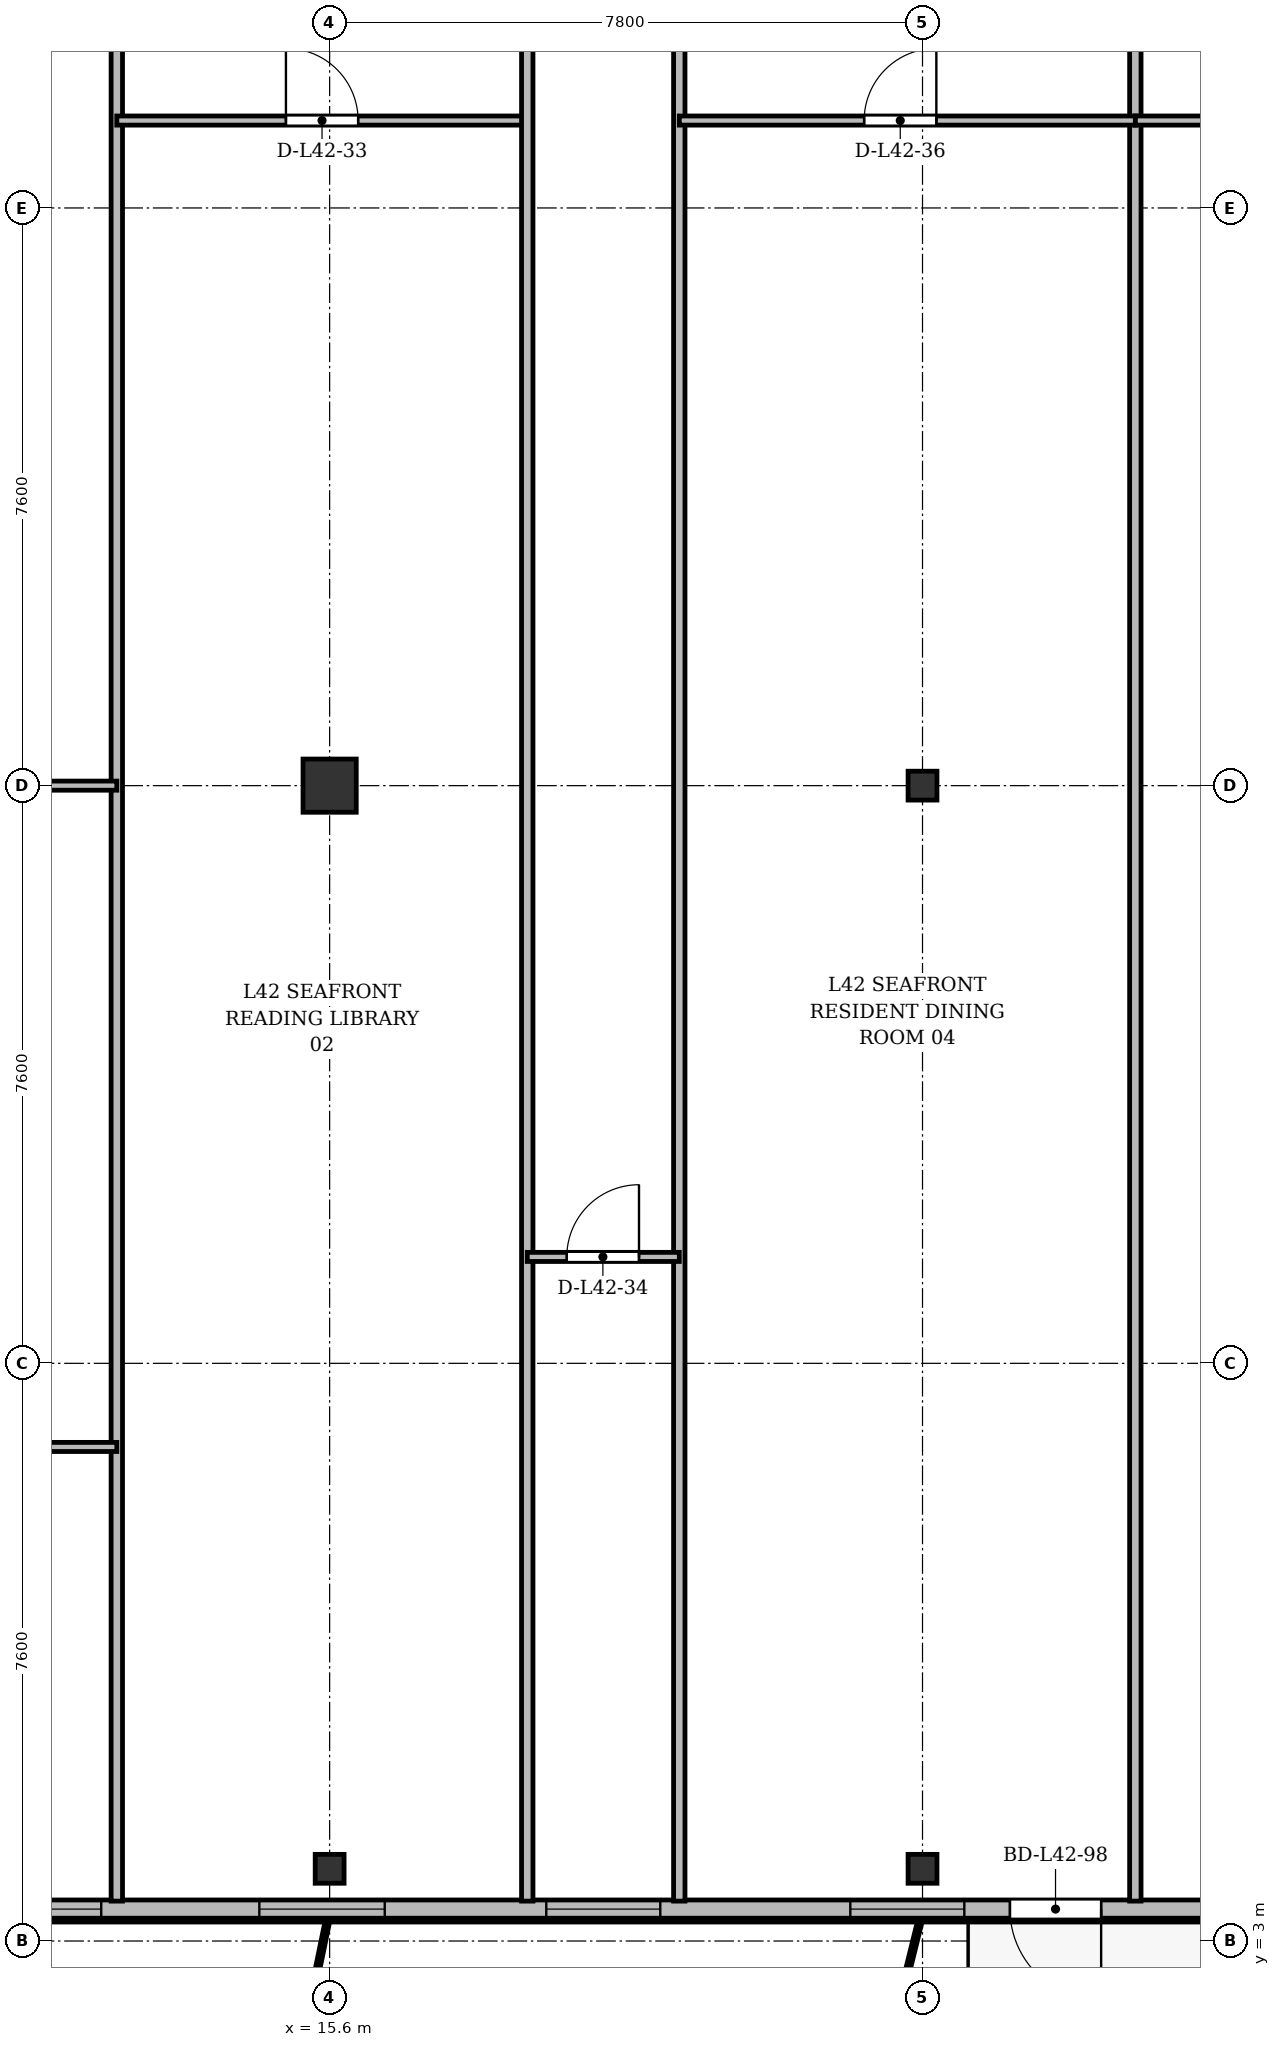
"""IFC4 building model, lengths in metres.
Left out: names, types, materials, properties, quantities, classifications, styles, units other than length and angle.
Written with IfcOpenShell. Run it as: python <this file> out.ifc"""

import sys

from ifc_helpers import new_model, si_unit, direction, frame, frame_2d, origin, origin_2d, place, context, subcontext, project, spatial, rectangle, i_section, extrude, source, transform, mapped, element, fill, save


model = new_model("IFC4")
c1 = context("Model", 3, precision=1e-05, world=origin(), true_north=direction((0.0, 1.0)))
c2 = subcontext(c1, "Body", "Model", "MODEL_VIEW")
j1 = project(units=[si_unit("LENGTHUNIT", "METRE"), si_unit("PLANEANGLEUNIT", "RADIAN")], contexts=[c1])
p1 = place(None, origin())
s1 = spatial("IfcSite", under=j1, at=p1, CompositionType="ELEMENT")
p2 = place(p1, origin())
s2 = spatial("IfcBuilding", under=s1, at=p2, CompositionType="ELEMENT")
p3 = place(p2, frame((0.0, 0.0, 160.9)))
s3 = spatial("IfcBuildingStorey", under=s2, at=p3, CompositionType="ELEMENT", Elevation=160.9)
m1 = source(origin(), c2, "Body", "SweptSolid", [
    extrude(i_section(OverallWidth=0.38, OverallDepth=0.38, WebThickness=0.02, FlangeThickness=0.03, at=origin_2d()), origin(), (0.0, 0.0, 1.0), 3.6),
])
p4 = place(p3, frame((15.6, 3.95, 0.0), z_axis=(0.0, 0.0, 1.0), x_axis=(1.0, 0.0, 0.0)))
e1 = element("IfcColumn", 1, at=p4, inside=s3, PredefinedType="COLUMN", context=c2, shape_type="MappedRepresentation", body=[
    mapped(m1, transform((0.0, 0.0, 0.0), x_axis=(1.0, 0.0, 0.0), y_axis=(0.0, 1.0, 0.0), z_axis=(0.0, 0.0, 1.0), scale=1.0)),
])
m2 = source(origin(), c2, "Body", "SweptSolid", [
    extrude(rectangle(XDim=0.7, YDim=0.7, at=origin_2d()), origin(), (0.0, 0.0, 1.0), 3.6),
])
p5 = place(p3, frame((15.6, 18.2, 0.0), z_axis=(0.0, 0.0, 1.0), x_axis=(1.0, 0.0, 0.0)))
e2 = element("IfcColumn", 2, at=p5, inside=s3, PredefinedType="COLUMN", context=c2, shape_type="MappedRepresentation", body=[
    mapped(m2, transform((0.0, 0.0, 0.0), x_axis=(1.0, 0.0, 0.0), y_axis=(0.0, 1.0, 0.0), z_axis=(0.0, 0.0, 1.0), scale=1.0)),
])
for number, where, z_axis, x_axis in (
    (3, (23.4, 3.95, 0.0), (0.0, 0.0, 1.0), (1.0, 0.0, 0.0)),
    (4, (23.4, 18.2, 0.0), (0.0, 0.0, 1.0), (1.0, 0.0, 0.0)),
):
    element("IfcColumn", number, at=place(p3, frame(where, z_axis=z_axis, x_axis=x_axis)), inside=s3, PredefinedType="COLUMN", context=c2, shape_type="MappedRepresentation", body=[
        mapped(m1, transform((0.0, 0.0, 0.0), x_axis=(1.0, 0.0, 0.0), y_axis=(0.0, 1.0, 0.0), z_axis=(0.0, 0.0, 1.0), scale=1.0)),
    ])
p6 = place(p3, frame((63.6, 3.42, 0.0), z_axis=(0.0, 0.0, 1.0), x_axis=(-1.0, 0.0, 0.0)))
e5 = element("IfcWall", 5, at=p6, inside=s3, PredefinedType="SOLIDWALL", context=c2, shape_type="SweptSolid", body=[
    extrude(rectangle(XDim=52.8, YDim=0.24, at=frame_2d((26.4, 0.0))), origin(), (0.0, 0.0, 1.0), 3.35),
])
p7 = place(p6, frame((0.295, 0.0, 0.9)))
e6 = element("IfcOpeningElement", 6, at=p7, cuts=e5, PredefinedType="OPENING", context=c2, shape_type="SweptSolid", body=[
    extrude(rectangle(XDim=1.5, YDim=1.75, at=frame_2d((0.75, 0.875))), frame((0.0, 0.13, 0.0), z_axis=(0.0, -1.0, 0.0), x_axis=(1.0, 0.0, 0.0)), (0.0, 0.0, 1.0), 0.26),
])
p8 = place(p6, frame((3.7, 0.0, 0.9)))
e7 = element("IfcOpeningElement", 7, at=p8, cuts=e5, PredefinedType="OPENING", context=c2, shape_type="SweptSolid", body=[
    extrude(rectangle(XDim=2.0, YDim=1.95, at=frame_2d((1.0, 0.975))), frame((0.0, 0.13, 0.0), z_axis=(0.0, -1.0, 0.0), x_axis=(1.0, 0.0, 0.0)), (0.0, 0.0, 1.0), 0.26),
])
p9 = place(p6, frame((7.635, 0.0, 0.0)))
e8 = element("IfcOpeningElement", 8, at=p9, cuts=e5, PredefinedType="OPENING", context=c2, shape_type="SweptSolid", body=[
    extrude(rectangle(XDim=1.2, YDim=2.2, at=frame_2d((0.6, 1.1))), frame((0.0, 0.13, 0.0), z_axis=(0.0, -1.0, 0.0), x_axis=(1.0, 0.0, 0.0)), (0.0, 0.0, 1.0), 0.26),
])
p10 = place(p6, frame((9.7, 0.0, 0.9)))
e9 = element("IfcOpeningElement", 9, at=p10, cuts=e5, PredefinedType="OPENING", context=c2, shape_type="SweptSolid", body=[
    extrude(rectangle(XDim=1.8, YDim=1.8, at=frame_2d((0.9, 0.9))), frame((0.0, 0.13, 0.0), z_axis=(0.0, -1.0, 0.0), x_axis=(1.0, 0.0, 0.0)), (0.0, 0.0, 1.0), 0.26),
])
p11 = place(p6, frame((12.25, 0.0, 0.9)))
e10 = element("IfcOpeningElement", 10, at=p11, cuts=e5, PredefinedType="OPENING", context=c2, shape_type="SweptSolid", body=[
    extrude(rectangle(XDim=1.5, YDim=1.75, at=frame_2d((0.75, 0.875))), frame((0.0, 0.13, 0.0), z_axis=(0.0, -1.0, 0.0), x_axis=(1.0, 0.0, 0.0)), (0.0, 0.0, 1.0), 0.26),
])
p12 = place(p6, frame((16.25, 0.0, 0.9)))
e11 = element("IfcOpeningElement", 11, at=p12, cuts=e5, PredefinedType="OPENING", context=c2, shape_type="SweptSolid", body=[
    extrude(rectangle(XDim=1.5, YDim=1.75, at=frame_2d((0.75, 0.875))), frame((0.0, 0.13, 0.0), z_axis=(0.0, -1.0, 0.0), x_axis=(1.0, 0.0, 0.0)), (0.0, 0.0, 1.0), 0.26),
])
p13 = place(p6, frame((22.4, 0.0, 0.9)))
e12 = element("IfcOpeningElement", 12, at=p13, cuts=e5, PredefinedType="OPENING", context=c2, shape_type="SweptSolid", body=[
    extrude(rectangle(XDim=2.0, YDim=1.95, at=frame_2d((1.0, 0.975))), frame((0.0, 0.13, 0.0), z_axis=(0.0, -1.0, 0.0), x_axis=(1.0, 0.0, 0.0)), (0.0, 0.0, 1.0), 0.26),
])
p14 = place(p6, frame((27.675, 0.0, 0.9)))
e13 = element("IfcOpeningElement", 13, at=p14, cuts=e5, PredefinedType="OPENING", context=c2, shape_type="SweptSolid", body=[
    extrude(rectangle(XDim=1.65, YDim=1.85, at=frame_2d((0.825, 0.925))), frame((0.0, 0.13, 0.0), z_axis=(0.0, -1.0, 0.0), x_axis=(1.0, 0.0, 0.0)), (0.0, 0.0, 1.0), 0.26),
])
p15 = place(p6, frame((30.6, 0.0, 0.9)))
e14 = element("IfcOpeningElement", 14, at=p15, cuts=e5, PredefinedType="OPENING", context=c2, shape_type="SweptSolid", body=[
    extrude(rectangle(XDim=1.8, YDim=1.8, at=frame_2d((0.9, 0.9))), frame((0.0, 0.13, 0.0), z_axis=(0.0, -1.0, 0.0), x_axis=(1.0, 0.0, 0.0)), (0.0, 0.0, 1.0), 0.26),
])
p16 = place(p6, frame((34.1, 0.0, 0.9)))
e15 = element("IfcOpeningElement", 15, at=p16, cuts=e5, PredefinedType="OPENING", context=c2, shape_type="SweptSolid", body=[
    extrude(rectangle(XDim=2.2, YDim=1.8, at=frame_2d((1.1, 0.9))), frame((0.0, 0.13, 0.0), z_axis=(0.0, -1.0, 0.0), x_axis=(1.0, 0.0, 0.0)), (0.0, 0.0, 1.0), 0.26),
])
p17 = place(p6, frame((39.65, 0.0, 0.9)))
e16 = element("IfcOpeningElement", 16, at=p17, cuts=e5, PredefinedType="OPENING", context=c2, shape_type="SweptSolid", body=[
    extrude(rectangle(XDim=1.5, YDim=1.75, at=frame_2d((0.75, 0.875))), frame((0.0, 0.13, 0.0), z_axis=(0.0, -1.0, 0.0), x_axis=(1.0, 0.0, 0.0)), (0.0, 0.0, 1.0), 0.26),
])
p18 = place(p6, frame((43.65, 0.0, 0.9)))
e17 = element("IfcOpeningElement", 17, at=p18, cuts=e5, PredefinedType="OPENING", context=c2, shape_type="SweptSolid", body=[
    extrude(rectangle(XDim=1.5, YDim=1.75, at=frame_2d((0.75, 0.875))), frame((0.0, 0.13, 0.0), z_axis=(0.0, -1.0, 0.0), x_axis=(1.0, 0.0, 0.0)), (0.0, 0.0, 1.0), 0.26),
])
p19 = place(p6, frame((47.275, 0.0, 0.9)))
e18 = element("IfcOpeningElement", 18, at=p19, cuts=e5, PredefinedType="OPENING", context=c2, shape_type="SweptSolid", body=[
    extrude(rectangle(XDim=1.65, YDim=1.85, at=frame_2d((0.825, 0.925))), frame((0.0, 0.13, 0.0), z_axis=(0.0, -1.0, 0.0), x_axis=(1.0, 0.0, 0.0)), (0.0, 0.0, 1.0), 0.26),
])
p20 = place(p6, frame((51.005, 0.0, 0.9)))
e19 = element("IfcOpeningElement", 19, at=p20, cuts=e5, PredefinedType="OPENING", context=c2, shape_type="SweptSolid", body=[
    extrude(rectangle(XDim=1.5, YDim=1.75, at=frame_2d((0.75, 0.875))), frame((0.0, 0.13, 0.0), z_axis=(0.0, -1.0, 0.0), x_axis=(1.0, 0.0, 0.0)), (0.0, 0.0, 1.0), 0.26),
])
p21 = place(p6, frame((37.85, 0.0, 0.0)))
e20 = element("IfcOpeningElement", 20, at=p21, cuts=e5, PredefinedType="OPENING", context=c2, shape_type="SweptSolid", body=[
    extrude(rectangle(XDim=1.2, YDim=2.2, at=frame_2d((0.6, 1.1))), frame((0.0, 0.13, 0.0), z_axis=(0.0, -1.0, 0.0), x_axis=(1.0, 0.0, 0.0)), (0.0, 0.0, 1.0), 0.26),
])
for number, where, z_axis, x_axis in (
    (21, (12.8, 3.525, 0.0), (0.0, 0.0, 1.0), (0.0, 1.0, 0.0)),
    (22, (26.2, 3.525, 0.0), (0.0, 0.0, 1.0), (0.0, 1.0, 0.0)),
):
    element("IfcWall", number, at=place(p3, frame(where, z_axis=z_axis, x_axis=x_axis)), inside=s3, PredefinedType="PARTITIONING", context=c2, shape_type="SweptSolid", body=[
        extrude(rectangle(XDim=27.275, YDim=0.15, at=frame_2d((13.638, 0.0))), origin(), (0.0, 0.0, 1.0), 2.75),
    ])
p22 = place(p3, frame((8.04, 18.2, 0.0), z_axis=(0.0, 0.0, 1.0), x_axis=(1.0, 0.0, 0.0)))
e23 = element("IfcWall", 23, at=p22, inside=s3, PredefinedType="PARTITIONING", context=c2, shape_type="SweptSolid", body=[
    extrude(rectangle(XDim=4.76, YDim=0.12, at=frame_2d((2.38, 0.0))), origin(), (0.0, 0.0, 1.0), 2.75),
])
p23 = place(p22, frame((1.905, 0.0, 0.0)))
e24 = element("IfcOpeningElement", 24, at=p23, cuts=e23, PredefinedType="OPENING", context=c2, shape_type="SweptSolid", body=[
    extrude(rectangle(XDim=0.95, YDim=2.15, at=frame_2d((0.475, 1.075))), frame((0.0, 0.07, 0.0), z_axis=(0.0, -1.0, 0.0), x_axis=(1.0, 0.0, 0.0)), (0.0, 0.0, 1.0), 0.14),
])
p24 = place(p3, frame((8.04, 9.5, 0.0), z_axis=(0.0, 0.0, 1.0), x_axis=(1.0, 0.0, 0.0)))
e25 = element("IfcWall", 25, at=p24, inside=s3, PredefinedType="PARTITIONING", context=c2, shape_type="SweptSolid", body=[
    extrude(rectangle(XDim=4.76, YDim=0.12, at=frame_2d((2.38, 0.0))), origin(), (0.0, 0.0, 1.0), 2.85),
])
p25 = place(p24, frame((1.905, 0.0, 0.0)))
e26 = element("IfcOpeningElement", 26, at=p25, cuts=e25, PredefinedType="OPENING", context=c2, shape_type="SweptSolid", body=[
    extrude(rectangle(XDim=0.95, YDim=2.15, at=frame_2d((0.475, 1.075))), frame((0.0, 0.07, 0.0), z_axis=(0.0, -1.0, 0.0), x_axis=(1.0, 0.0, 0.0)), (0.0, 0.0, 1.0), 0.14),
])
p26 = place(p3, frame((12.8, 26.95, 0.0), z_axis=(0.0, 0.0, 1.0), x_axis=(1.0, 0.0, 0.0)))
e27 = element("IfcWall", 27, at=p26, inside=s3, PredefinedType="PARTITIONING", context=c2, shape_type="SweptSolid", body=[
    extrude(rectangle(XDim=5.4, YDim=0.12, at=frame_2d((2.7, 0.0))), origin(), (0.0, 0.0, 1.0), 2.85),
])
p27 = place(p26, frame((2.225, 0.0, 0.0)))
e28 = element("IfcOpeningElement", 28, at=p27, cuts=e27, PredefinedType="OPENING", context=c2, shape_type="SweptSolid", body=[
    extrude(rectangle(XDim=0.95, YDim=2.15, at=frame_2d((0.475, 1.075))), frame((0.0, 0.07, 0.0), z_axis=(0.0, -1.0, 0.0), x_axis=(1.0, 0.0, 0.0)), (0.0, 0.0, 1.0), 0.14),
])
for number, where, z_axis, x_axis in (
    (29, (18.2, 3.525, 0.0), (0.0, 0.0, 1.0), (0.0, 1.0, 0.0)),
    (30, (20.2, 3.525, 0.0), (0.0, 0.0, 1.0), (0.0, 1.0, 0.0)),
):
    element("IfcWall", number, at=place(p3, frame(where, z_axis=z_axis, x_axis=x_axis)), inside=s3, PredefinedType="PARTITIONING", context=c2, shape_type="SweptSolid", body=[
        extrude(rectangle(XDim=27.275, YDim=0.15, at=frame_2d((13.638, 0.0))), origin(), (0.0, 0.0, 1.0), 2.75),
    ])
p28 = place(p3, frame((18.2, 12.0, 0.0), z_axis=(0.0, 0.0, 1.0), x_axis=(1.0, 0.0, 0.0)))
e31 = element("IfcWall", 31, at=p28, inside=s3, PredefinedType="PARTITIONING", context=c2, shape_type="SweptSolid", body=[
    extrude(rectangle(XDim=2.0, YDim=0.12, at=frame_2d((1.0, 0.0))), origin(), (0.0, 0.0, 1.0), 3.35),
])
p29 = place(p28, frame((0.52, 0.0, 0.0)))
e32 = element("IfcOpeningElement", 32, at=p29, cuts=e31, PredefinedType="OPENING", context=c2, shape_type="SweptSolid", body=[
    extrude(rectangle(XDim=0.95, YDim=2.15, at=frame_2d((0.475, 1.075))), frame((0.0, 0.07, 0.0), z_axis=(0.0, -1.0, 0.0), x_axis=(1.0, 0.0, 0.0)), (0.0, 0.0, 1.0), 0.14),
])
p30 = place(p3, frame((20.2, 26.95, 0.0), z_axis=(0.0, 0.0, 1.0), x_axis=(1.0, 0.0, 0.0)))
e33 = element("IfcWall", 33, at=p30, inside=s3, PredefinedType="PARTITIONING", context=c2, shape_type="SweptSolid", body=[
    extrude(rectangle(XDim=6.0, YDim=0.12, at=frame_2d((3.0, 0.0))), origin(), (0.0, 0.0, 1.0), 2.85),
])
p31 = place(p30, frame((2.432, 0.0, 0.0)))
e34 = element("IfcOpeningElement", 34, at=p31, cuts=e33, PredefinedType="OPENING", context=c2, shape_type="SweptSolid", body=[
    extrude(rectangle(XDim=0.95, YDim=2.15, at=frame_2d((0.475, 1.075))), frame((0.0, 0.07, 0.0), z_axis=(0.0, -1.0, 0.0), x_axis=(1.0, 0.0, 0.0)), (0.0, 0.0, 1.0), 0.14),
])
p32 = place(p3, frame((26.2, 26.95, 0.0), z_axis=(0.0, 0.0, 1.0), x_axis=(1.0, 0.0, 0.0)))
e35 = element("IfcWall", 35, at=p32, inside=s3, PredefinedType="PARTITIONING", context=c2, shape_type="SweptSolid", body=[
    extrude(rectangle(XDim=4.4, YDim=0.12, at=frame_2d((2.2, 0.0))), origin(), (0.0, 0.0, 1.0), 2.85),
])
p33 = place(p32, frame((1.725, 0.0, 0.0)))
e36 = element("IfcOpeningElement", 36, at=p33, cuts=e35, PredefinedType="OPENING", context=c2, shape_type="SweptSolid", body=[
    extrude(rectangle(XDim=0.95, YDim=2.15, at=frame_2d((0.475, 1.075))), frame((0.0, 0.07, 0.0), z_axis=(0.0, -1.0, 0.0), x_axis=(1.0, 0.0, 0.0)), (0.0, 0.0, 1.0), 0.14),
])
m3 = source(origin(), c2, "Body", "SweptSolid", [
    extrude(rectangle(XDim=1.5, YDim=1.75, at=frame_2d((0.75, 0.875))), frame((0.0, 0.03, 0.0), z_axis=(0.0, -1.0, 0.0), x_axis=(1.0, 0.0, 0.0)), (0.0, 0.0, 1.0), 0.06),
])
p34 = place(p17, origin())
e37 = element("IfcWindow", 37, at=p34, inside=s3, PartitioningType="SINGLE_PANEL", PredefinedType="WINDOW", context=c2, shape_type="MappedRepresentation", body=[
    mapped(m3, transform((0.0, 0.0, 0.0), x_axis=(1.0, 0.0, 0.0), y_axis=(0.0, 1.0, 0.0), z_axis=(0.0, 0.0, 1.0), scale=1.0)),
])
fill(e16, e37)
p35 = place(p18, origin())
e38 = element("IfcWindow", 38, at=p35, inside=s3, PartitioningType="SINGLE_PANEL", PredefinedType="WINDOW", context=c2, shape_type="MappedRepresentation", body=[
    mapped(m3, transform((0.0, 0.0, 0.0), x_axis=(1.0, 0.0, 0.0), y_axis=(0.0, 1.0, 0.0), z_axis=(0.0, 0.0, 1.0), scale=1.0)),
])
fill(e17, e38)
m4 = source(origin(), c2, "Body", "SweptSolid", [
    extrude(rectangle(XDim=1.65, YDim=1.85, at=frame_2d((0.825, 0.925))), frame((0.0, 0.03, 0.0), z_axis=(0.0, -1.0, 0.0), x_axis=(1.0, 0.0, 0.0)), (0.0, 0.0, 1.0), 0.06),
])
p36 = place(p19, origin())
e39 = element("IfcWindow", 39, at=p36, inside=s3, PartitioningType="SINGLE_PANEL", PredefinedType="WINDOW", context=c2, shape_type="MappedRepresentation", body=[
    mapped(m4, transform((0.0, 0.0, 0.0), x_axis=(1.0, 0.0, 0.0), y_axis=(0.0, 1.0, 0.0), z_axis=(0.0, 0.0, 1.0), scale=1.0)),
])
fill(e18, e39)
p37 = place(p20, origin())
e40 = element("IfcWindow", 40, at=p37, inside=s3, PartitioningType="SINGLE_PANEL", PredefinedType="WINDOW", context=c2, shape_type="MappedRepresentation", body=[
    mapped(m3, transform((0.0, 0.0, 0.0), x_axis=(1.0, 0.0, 0.0), y_axis=(0.0, 1.0, 0.0), z_axis=(0.0, 0.0, 1.0), scale=1.0)),
])
fill(e19, e40)
m5 = source(origin(), c2, "Body", "SweptSolid", [
    extrude(rectangle(XDim=1.2, YDim=2.2, at=frame_2d((0.6, 1.1))), frame((0.0, 0.025, 0.0), z_axis=(0.0, -1.0, 0.0), x_axis=(1.0, 0.0, 0.0)), (0.0, 0.0, 1.0), 0.05),
])
p38 = place(p21, origin())
e41 = element("IfcDoor", 41, at=p38, inside=s3, OperationType="SINGLE_SWING_LEFT", PredefinedType="DOOR", context=c2, shape_type="MappedRepresentation", body=[
    mapped(m5, transform((0.0, 0.0, 0.0), x_axis=(1.0, 0.0, 0.0), y_axis=(0.0, 1.0, 0.0), z_axis=(0.0, 0.0, 1.0), scale=1.0)),
])
fill(e20, e41)
m6 = source(origin(), c2, "Body", "SweptSolid", [
    extrude(rectangle(XDim=0.95, YDim=2.15, at=frame_2d((0.475, 1.075))), frame((0.0, 0.025, 0.0), z_axis=(0.0, -1.0, 0.0), x_axis=(1.0, 0.0, 0.0)), (0.0, 0.0, 1.0), 0.05),
])
p39 = place(p27, origin())
e42 = element("IfcDoor", 42, at=p39, inside=s3, OperationType="SINGLE_SWING_LEFT", PredefinedType="DOOR", context=c2, shape_type="MappedRepresentation", body=[
    mapped(m6, transform((0.0, 0.0, 0.0), x_axis=(1.0, 0.0, 0.0), y_axis=(0.0, 1.0, 0.0), z_axis=(0.0, 0.0, 1.0), scale=1.0)),
])
fill(e28, e42)
p40 = place(p29, origin())
e43 = element("IfcDoor", 43, at=p40, inside=s3, OperationType="SINGLE_SWING_RIGHT", PredefinedType="DOOR", context=c2, shape_type="MappedRepresentation", body=[
    mapped(m6, transform((0.0, 0.0, 0.0), x_axis=(1.0, 0.0, 0.0), y_axis=(0.0, 1.0, 0.0), z_axis=(0.0, 0.0, 1.0), scale=1.0)),
])
fill(e32, e43)
p41 = place(p31, origin())
e44 = element("IfcDoor", 44, at=p41, inside=s3, OperationType="SINGLE_SWING_RIGHT", PredefinedType="DOOR", context=c2, shape_type="MappedRepresentation", body=[
    mapped(m6, transform((0.0, 0.0, 0.0), x_axis=(1.0, 0.0, 0.0), y_axis=(0.0, 1.0, 0.0), z_axis=(0.0, 0.0, 1.0), scale=1.0)),
])
fill(e34, e44)
save(model, sys.argv[1])
